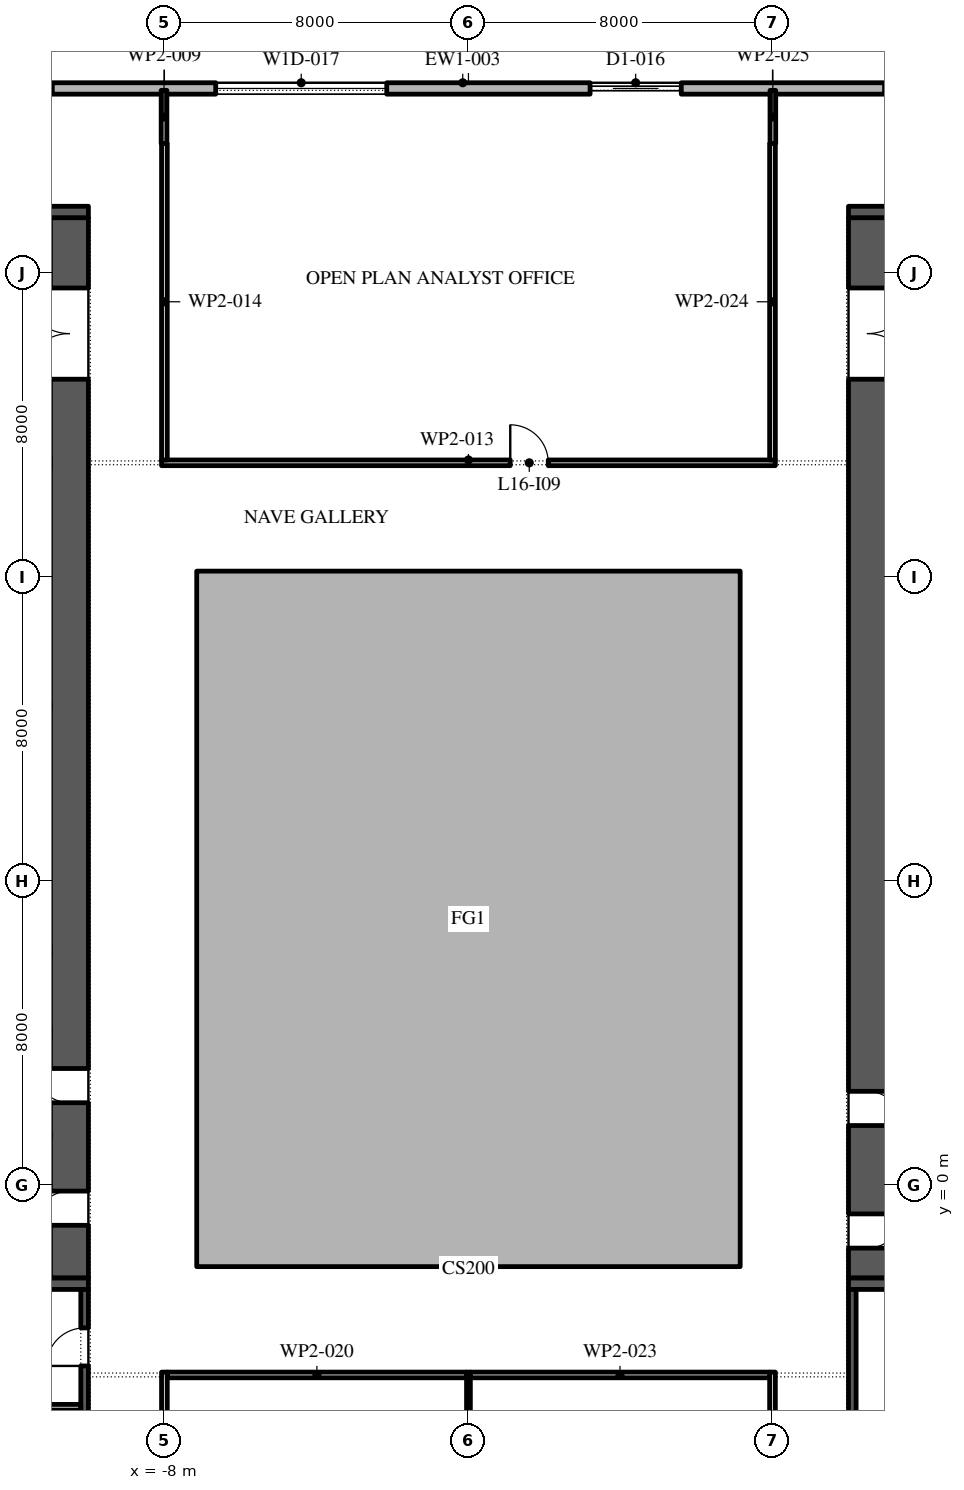
"""IFC4 building model, lengths in metres.
Left out: names, types, materials, properties, quantities, classifications, styles, units other than length and angle.
Written with IfcOpenShell. Run it as: python <this file> out.ifc"""

import sys

from ifc_helpers import new_model, si_unit, direction, frame, frame_2d, origin, place, context, subcontext, project, spatial, polyline, rectangle, outline, extrude, element, fill, save


model = new_model("IFC4")
c1 = context("Model", 3, precision=1e-05, world=origin(), true_north=direction((0.0, 1.0)))
c2 = subcontext(c1, "Body", "Model", "MODEL_VIEW")
j1 = project(units=[si_unit("LENGTHUNIT", "METRE"), si_unit("PLANEANGLEUNIT", "RADIAN")], contexts=[c1])
p1 = place(None, origin())
s1 = spatial("IfcSite", under=j1, at=p1, CompositionType="ELEMENT")
p2 = place(p1, origin())
s2 = spatial("IfcBuilding", under=s1, at=p2, CompositionType="ELEMENT")
p3 = place(p2, frame((0.0, 0.0, 77.4)))
s3 = spatial("IfcBuildingStorey", under=s2, at=p3, CompositionType="ELEMENT", Elevation=77.4)
p4 = place(p3, origin())
e1 = element("IfcWall", 1, at=p4, inside=s3, PredefinedType="STANDARD", context=c2, shape_type="SweptSolid", body=[
    extrude(outline(polyline([(-7.15, -2.15), (7.15, -2.15), (7.15, 16.15), (-7.15, 16.15), (-7.15, -2.15)]), holes=[polyline([(-7.0, -2.0), (-7.0, 16.0), (7.0, 16.0), (7.0, -2.0), (-7.0, -2.0)])]), origin(), (0.0, 0.0, 1.0), 4.0),
])
p5 = place(p3, frame((26.1, 28.85, 0.0), z_axis=(0.0, 0.0, 1.0), x_axis=(-1.0, 0.0, 0.0)))
e2 = element("IfcWall", 2, at=p5, inside=s3, PredefinedType="STANDARD", context=c2, shape_type="SweptSolid", body=[
    extrude(rectangle(XDim=52.5, YDim=0.3, at=frame_2d((26.25, 0.0))), origin(), (0.0, 0.0, 1.0), 4.0),
])
p6 = place(p5, frame((2.0, 0.0, 0.45)))
e3 = element("IfcOpeningElement", 3, at=p6, cuts=e2, PredefinedType="OPENING", context=c2, shape_type="SweptSolid", body=[
    extrude(rectangle(XDim=4.5, YDim=2.875, at=frame_2d((2.25, 1.438))), frame((0.0, 0.16, 0.0), z_axis=(0.0, -1.0, 0.0), x_axis=(1.0, 0.0, 0.0)), (0.0, 0.0, 1.0), 0.32),
])
p7 = place(p5, frame((10.65, 0.0, 0.45)))
e4 = element("IfcOpeningElement", 4, at=p7, cuts=e2, PredefinedType="OPENING", context=c2, shape_type="SweptSolid", body=[
    extrude(rectangle(XDim=4.5, YDim=2.875, at=frame_2d((2.25, 1.438))), frame((0.0, 0.16, 0.0), z_axis=(0.0, -1.0, 0.0), x_axis=(1.0, 0.0, 0.0)), (0.0, 0.0, 1.0), 0.32),
])
p8 = place(p5, frame((20.5, 0.0, 0.0)))
e5 = element("IfcOpeningElement", 5, at=p8, cuts=e2, PredefinedType="OPENING", context=c2, shape_type="SweptSolid", body=[
    extrude(rectangle(XDim=2.4, YDim=3.5, at=frame_2d((1.2, 1.75))), frame((0.0, 0.16, 0.0), z_axis=(0.0, -1.0, 0.0), x_axis=(1.0, 0.0, 0.0)), (0.0, 0.0, 1.0), 0.32),
])
p9 = place(p5, frame((28.25, 0.0, 0.45)))
e6 = element("IfcOpeningElement", 6, at=p9, cuts=e2, PredefinedType="OPENING", context=c2, shape_type="SweptSolid", body=[
    extrude(rectangle(XDim=4.5, YDim=2.875, at=frame_2d((2.25, 1.438))), frame((0.0, 0.16, 0.0), z_axis=(0.0, -1.0, 0.0), x_axis=(1.0, 0.0, 0.0)), (0.0, 0.0, 1.0), 0.32),
])
p10 = place(p5, frame((37.05, 0.0, 0.45)))
e7 = element("IfcOpeningElement", 7, at=p10, cuts=e2, PredefinedType="OPENING", context=c2, shape_type="SweptSolid", body=[
    extrude(rectangle(XDim=4.5, YDim=2.875, at=frame_2d((2.25, 1.438))), frame((0.0, 0.16, 0.0), z_axis=(0.0, -1.0, 0.0), x_axis=(1.0, 0.0, 0.0)), (0.0, 0.0, 1.0), 0.32),
])
p11 = place(p5, frame((45.85, 0.0, 0.45)))
e8 = element("IfcOpeningElement", 8, at=p11, cuts=e2, PredefinedType="OPENING", context=c2, shape_type="SweptSolid", body=[
    extrude(rectangle(XDim=4.5, YDim=2.875, at=frame_2d((2.25, 1.438))), frame((0.0, 0.16, 0.0), z_axis=(0.0, -1.0, 0.0), x_axis=(1.0, 0.0, 0.0)), (0.0, 0.0, 1.0), 0.32),
])
p12 = place(p3, frame((-10.5, -2.45, 0.0), z_axis=(0.0, 0.0, 1.0), x_axis=(0.0, 1.0, 0.0)))
e9 = element("IfcWall", 9, at=p12, inside=s3, PredefinedType="SHEAR", context=c2, shape_type="SweptSolid", body=[
    extrude(rectangle(XDim=27.9, YDim=1.0, at=frame_2d((13.95, 0.0))), origin(), (0.0, 0.0, 1.0), 4.0),
])
p13 = place(p12, frame((23.65, 0.0, 0.0)))
e10 = element("IfcOpeningElement", 10, at=p13, cuts=e9, PredefinedType="OPENING", context=c2, shape_type="SweptSolid", body=[
    extrude(rectangle(XDim=2.4, YDim=2.1, at=frame_2d((1.2, 1.05))), frame((0.0, 0.51, 0.0), z_axis=(0.0, -1.0, 0.0), x_axis=(1.0, 0.0, 0.0)), (0.0, 0.0, 1.0), 1.02),
])
p14 = place(p12, frame((1.387, 0.0, 0.0)))
e11 = element("IfcOpeningElement", 11, at=p14, cuts=e9, PredefinedType="OPENING", context=c2, shape_type="SweptSolid", body=[
    extrude(rectangle(XDim=0.9, YDim=2.1, at=frame_2d((0.45, 1.05))), frame((0.0, 0.51, 0.0), z_axis=(0.0, -1.0, 0.0), x_axis=(1.0, 0.0, 0.0)), (0.0, 0.0, 1.0), 1.02),
])
p15 = place(p12, frame((4.613, 0.0, 0.0)))
e12 = element("IfcOpeningElement", 12, at=p15, cuts=e9, PredefinedType="OPENING", context=c2, shape_type="SweptSolid", body=[
    extrude(rectangle(XDim=0.9, YDim=2.1, at=frame_2d((0.45, 1.05))), frame((0.0, 0.51, 0.0), z_axis=(0.0, -1.0, 0.0), x_axis=(1.0, 0.0, 0.0)), (0.0, 0.0, 1.0), 1.02),
])
for number, where, z_axis, x_axis in (
    (13, (-22.0, -2.6, 0.0), (0.0, 0.0, 1.0), (1.0, 0.0, 0.0)),
    (14, (-22.0, 25.6, 0.0), (0.0, 0.0, 1.0), (1.0, 0.0, 0.0)),
):
    element("IfcWall", number, at=place(p3, frame(where, z_axis=z_axis, x_axis=x_axis)), inside=s3, PredefinedType="SHEAR", context=c2, shape_type="SweptSolid", body=[
        extrude(rectangle(XDim=12.0, YDim=0.3, at=frame_2d((6.0, 0.0))), origin(), (0.0, 0.0, 1.0), 4.0),
    ])
p16 = place(p3, frame((-10.1, -15.8, 0.0), z_axis=(0.0, 0.0, 1.0), x_axis=(0.0, 1.0, 0.0)))
e15 = element("IfcWall", 15, at=p16, inside=s3, PredefinedType="SHEAR", context=c2, shape_type="SweptSolid", body=[
    extrude(rectangle(XDim=13.05, YDim=0.2, at=frame_2d((6.525, 0.0))), origin(), (0.0, 0.0, 1.0), 4.0),
])
p17 = place(p16, frame((4.488, 0.0, 0.0)))
e16 = element("IfcOpeningElement", 16, at=p17, cuts=e15, PredefinedType="OPENING", context=c2, shape_type="SweptSolid", body=[
    extrude(rectangle(XDim=0.9, YDim=2.1, at=frame_2d((0.45, 1.05))), frame((0.0, 0.11, 0.0), z_axis=(0.0, -1.0, 0.0), x_axis=(1.0, 0.0, 0.0)), (0.0, 0.0, 1.0), 0.22),
])
p18 = place(p16, frame((11.038, 0.0, 0.0)))
e17 = element("IfcOpeningElement", 17, at=p18, cuts=e15, PredefinedType="OPENING", context=c2, shape_type="SweptSolid", body=[
    extrude(rectangle(XDim=1.0, YDim=2.1, at=frame_2d((0.5, 1.05))), frame((0.0, 0.11, 0.0), z_axis=(0.0, -1.0, 0.0), x_axis=(1.0, 0.0, 0.0)), (0.0, 0.0, 1.0), 0.22),
])
p19 = place(p3, frame((-21.8, -5.85, 0.0), z_axis=(0.0, 0.0, 1.0), x_axis=(1.0, 0.0, 0.0)))
e18 = element("IfcWall", 18, at=p19, inside=s3, PredefinedType="PARTITIONING", context=c2, shape_type="SweptSolid", body=[
    extrude(rectangle(XDim=11.6, YDim=0.15, at=frame_2d((5.8, 0.0))), origin(), (0.0, 0.0, 1.0), 4.0),
])
p20 = place(p3, frame((10.5, -2.45, 0.0), z_axis=(0.0, 0.0, 1.0), x_axis=(0.0, 1.0, 0.0)))
e19 = element("IfcWall", 19, at=p20, inside=s3, PredefinedType="SHEAR", context=c2, shape_type="SweptSolid", body=[
    extrude(rectangle(XDim=27.9, YDim=1.0, at=frame_2d((13.95, 0.0))), origin(), (0.0, 0.0, 1.0), 4.0),
])
p21 = place(p20, frame((23.65, 0.0, 0.0)))
e20 = element("IfcOpeningElement", 20, at=p21, cuts=e19, PredefinedType="OPENING", context=c2, shape_type="SweptSolid", body=[
    extrude(rectangle(XDim=2.4, YDim=2.1, at=frame_2d((1.2, 1.05))), frame((0.0, 0.51, 0.0), z_axis=(0.0, -1.0, 0.0), x_axis=(1.0, 0.0, 0.0)), (0.0, 0.0, 1.0), 1.02),
])
p22 = place(p20, frame((0.788, 0.0, 0.0)))
e21 = element("IfcOpeningElement", 21, at=p22, cuts=e19, PredefinedType="OPENING", context=c2, shape_type="SweptSolid", body=[
    extrude(rectangle(XDim=0.9, YDim=2.1, at=frame_2d((0.45, 1.05))), frame((0.0, 0.51, 0.0), z_axis=(0.0, -1.0, 0.0), x_axis=(1.0, 0.0, 0.0)), (0.0, 0.0, 1.0), 1.02),
])
p23 = place(p20, frame((4.012, 0.0, 0.0)))
e22 = element("IfcOpeningElement", 22, at=p23, cuts=e19, PredefinedType="OPENING", context=c2, shape_type="SweptSolid", body=[
    extrude(rectangle(XDim=0.9, YDim=2.1, at=frame_2d((0.45, 1.05))), frame((0.0, 0.51, 0.0), z_axis=(0.0, -1.0, 0.0), x_axis=(1.0, 0.0, 0.0)), (0.0, 0.0, 1.0), 1.02),
])
for number, where, z_axis, x_axis in (
    (23, (10.0, -2.6, 0.0), (0.0, 0.0, 1.0), (1.0, 0.0, 0.0)),
    (24, (10.0, 25.6, 0.0), (0.0, 0.0, 1.0), (1.0, 0.0, 0.0)),
):
    element("IfcWall", number, at=place(p3, frame(where, z_axis=z_axis, x_axis=x_axis)), inside=s3, PredefinedType="SHEAR", context=c2, shape_type="SweptSolid", body=[
        extrude(rectangle(XDim=12.0, YDim=0.3, at=frame_2d((6.0, 0.0))), origin(), (0.0, 0.0, 1.0), 4.0),
    ])
p24 = place(p3, frame((10.1, -15.8, 0.0), z_axis=(0.0, 0.0, 1.0), x_axis=(0.0, 1.0, 0.0)))
e25 = element("IfcWall", 25, at=p24, inside=s3, PredefinedType="SHEAR", context=c2, shape_type="SweptSolid", body=[
    extrude(rectangle(XDim=13.05, YDim=0.2, at=frame_2d((6.525, 0.0))), origin(), (0.0, 0.0, 1.0), 4.0),
])
p25 = place(p24, frame((6.075, 0.0, 0.0)))
e26 = element("IfcOpeningElement", 26, at=p25, cuts=e25, PredefinedType="OPENING", context=c2, shape_type="SweptSolid", body=[
    extrude(rectangle(XDim=0.9, YDim=2.1, at=frame_2d((0.45, 1.05))), frame((0.0, 0.11, 0.0), z_axis=(0.0, -1.0, 0.0), x_axis=(1.0, 0.0, 0.0)), (0.0, 0.0, 1.0), 0.22),
])
p26 = place(p3, frame((-8.01, 28.8, 0.0), z_axis=(0.0, 0.0, 1.0), x_axis=(0.0, -1.0, 0.0)))
e27 = element("IfcWall", 27, at=p26, inside=s3, PredefinedType="PARTITIONING", context=c2, shape_type="SweptSolid", body=[
    extrude(rectangle(XDim=1.4, YDim=0.15, at=frame_2d((0.7, 0.0))), origin(), (0.0, 0.0, 1.0), 4.0),
])
p27 = place(p3, frame((-8.0, -4.925, 0.0), z_axis=(0.0, 0.0, 1.0), x_axis=(0.0, -1.0, 0.0)))
e28 = element("IfcWall", 28, at=p27, inside=s3, PredefinedType="PARTITIONING", context=c2, shape_type="SweptSolid", body=[
    extrude(rectangle(XDim=9.625, YDim=0.15, at=frame_2d((4.812, 0.0))), origin(), (0.0, 0.0, 1.0), 4.0),
])
p28 = place(p27, frame((6.175, 0.0, 0.0)))
e29 = element("IfcOpeningElement", 29, at=p28, cuts=e28, PredefinedType="OPENING", context=c2, shape_type="SweptSolid", body=[
    extrude(rectangle(XDim=1.0, YDim=2.1, at=frame_2d((0.5, 1.05))), frame((0.0, 0.085, 0.0), z_axis=(0.0, -1.0, 0.0), x_axis=(1.0, 0.0, 0.0)), (0.0, 0.0, 1.0), 0.17),
])
p29 = place(p3, frame((-8.075, 19.0, 0.0), z_axis=(0.0, 0.0, 1.0), x_axis=(1.0, 0.0, 0.0)))
e30 = element("IfcWall", 30, at=p29, inside=s3, PredefinedType="PARTITIONING", context=c2, shape_type="SweptSolid", body=[
    extrude(rectangle(XDim=16.15, YDim=0.15, at=frame_2d((8.075, 0.0))), origin(), (0.0, 0.0, 1.0), 4.0),
])
p30 = place(p29, frame((9.175, 0.0, 0.0)))
e31 = element("IfcOpeningElement", 31, at=p30, cuts=e30, PredefinedType="OPENING", context=c2, shape_type="SweptSolid", body=[
    extrude(rectangle(XDim=1.0, YDim=2.1, at=frame_2d((0.5, 1.05))), frame((0.0, 0.085, 0.0), z_axis=(0.0, -1.0, 0.0), x_axis=(1.0, 0.0, 0.0)), (0.0, 0.0, 1.0), 0.17),
])
p31 = place(p3, frame((-8.0, 27.4, 0.0), z_axis=(0.0, 0.0, 1.0), x_axis=(0.0, -1.0, 0.0)))
e32 = element("IfcWall", 32, at=p31, inside=s3, PredefinedType="PARTITIONING", context=c2, shape_type="SweptSolid", body=[
    extrude(rectangle(XDim=8.325, YDim=0.15, at=frame_2d((4.163, 0.0))), origin(), (0.0, 0.0, 1.0), 4.0),
])
p32 = place(p3, frame((0.0, -14.05, 0.0), z_axis=(0.0, 0.0, 1.0), x_axis=(0.0, 1.0, 0.0)))
e33 = element("IfcWall", 33, at=p32, inside=s3, PredefinedType="PARTITIONING", context=c2, shape_type="SweptSolid", body=[
    extrude(rectangle(XDim=9.125, YDim=0.1, at=frame_2d((4.562, 0.0))), origin(), (0.0, 0.0, 1.0), 4.0),
])
p33 = place(p3, frame((-0.05, -5.0, 0.0), z_axis=(0.0, 0.0, 1.0), x_axis=(-1.0, 0.0, 0.0)))
e34 = element("IfcWall", 34, at=p33, inside=s3, PredefinedType="PARTITIONING", context=c2, shape_type="SweptSolid", body=[
    extrude(rectangle(XDim=7.875, YDim=0.15, at=frame_2d((3.938, 0.0))), origin(), (0.0, 0.0, 1.0), 4.0),
])
p34 = place(p3, frame((8.0, -13.95, 0.0), z_axis=(0.0, 0.0, 1.0), x_axis=(0.0, 1.0, 0.0)))
e35 = element("IfcWall", 35, at=p34, inside=s3, PredefinedType="PARTITIONING", context=c2, shape_type="SweptSolid", body=[
    extrude(rectangle(XDim=9.025, YDim=0.15, at=frame_2d((4.512, 0.0))), origin(), (0.0, 0.0, 1.0), 4.0),
])
p35 = place(p34, frame((4.05, 0.0, 0.0)))
e36 = element("IfcOpeningElement", 36, at=p35, cuts=e35, PredefinedType="OPENING", context=c2, shape_type="SweptSolid", body=[
    extrude(rectangle(XDim=1.0, YDim=2.1, at=frame_2d((0.5, 1.05))), frame((0.0, 0.085, 0.0), z_axis=(0.0, -1.0, 0.0), x_axis=(1.0, 0.0, 0.0)), (0.0, 0.0, 1.0), 0.17),
])
p36 = place(p3, frame((7.925, -5.0, 0.0), z_axis=(0.0, 0.0, 1.0), x_axis=(-1.0, 0.0, 0.0)))
e37 = element("IfcWall", 37, at=p36, inside=s3, PredefinedType="PARTITIONING", context=c2, shape_type="SweptSolid", body=[
    extrude(rectangle(XDim=7.875, YDim=0.15, at=frame_2d((3.938, 0.0))), origin(), (0.0, 0.0, 1.0), 4.0),
])
p37 = place(p3, frame((8.0, 19.075, 0.0), z_axis=(0.0, 0.0, 1.0), x_axis=(0.0, 1.0, 0.0)))
e38 = element("IfcWall", 38, at=p37, inside=s3, PredefinedType="PARTITIONING", context=c2, shape_type="SweptSolid", body=[
    extrude(rectangle(XDim=8.325, YDim=0.15, at=frame_2d((4.163, 0.0))), origin(), (0.0, 0.0, 1.0), 4.0),
])
p38 = place(p3, frame((8.01, 27.4, 0.0), z_axis=(0.0, 0.0, 1.0), x_axis=(0.0, 1.0, 0.0)))
e39 = element("IfcWall", 39, at=p38, inside=s3, PredefinedType="PARTITIONING", context=c2, shape_type="SweptSolid", body=[
    extrude(rectangle(XDim=1.4, YDim=0.15, at=frame_2d((0.7, 0.0))), origin(), (0.0, 0.0, 1.0), 4.0),
])
p39 = place(p8, origin())
e40 = element("IfcDoor", 40, at=p39, inside=s3, OperationType="DOUBLE_DOOR_SLIDING", PredefinedType="DOOR", context=c2, shape_type="SweptSolid", body=[
    extrude(rectangle(XDim=2.4, YDim=3.5, at=frame_2d((1.2, 1.75))), frame((0.0, 0.025, 0.0), z_axis=(0.0, -1.0, 0.0), x_axis=(1.0, 0.0, 0.0)), (0.0, 0.0, 1.0), 0.05),
])
fill(e5, e40)
p40 = place(p9, origin())
e41 = element("IfcWindow", 41, at=p40, inside=s3, PartitioningType="DOUBLE_PANEL_VERTICAL", PredefinedType="WINDOW", context=c2, shape_type="SweptSolid", body=[
    extrude(rectangle(XDim=4.5, YDim=2.875, at=frame_2d((2.25, 1.438))), frame((0.0, 0.03, 0.0), z_axis=(0.0, -1.0, 0.0), x_axis=(1.0, 0.0, 0.0)), (0.0, 0.0, 1.0), 0.06),
])
fill(e6, e41)
p41 = place(p13, origin())
e42 = element("IfcDoor", 42, at=p41, inside=s3, OperationType="DOUBLE_DOOR_SINGLE_SWING", PredefinedType="DOOR", context=c2, shape_type="SweptSolid", body=[
    extrude(rectangle(XDim=2.4, YDim=2.1, at=frame_2d((1.2, 1.05))), frame((0.0, 0.025, 0.0), z_axis=(0.0, -1.0, 0.0), x_axis=(1.0, 0.0, 0.0)), (0.0, 0.0, 1.0), 0.05),
])
fill(e10, e42)
p42 = place(p18, origin())
e43 = element("IfcDoor", 43, at=p42, inside=s3, OperationType="SINGLE_SWING_RIGHT", PredefinedType="DOOR", context=c2, shape_type="SweptSolid", body=[
    extrude(rectangle(XDim=1.0, YDim=2.1, at=frame_2d((0.5, 1.05))), frame((0.0, 0.1, 0.0), z_axis=(0.0, -1.0, 0.0), x_axis=(1.0, 0.0, 0.0)), (0.0, 0.0, 1.0), 0.05),
])
fill(e17, e43)
p43 = place(p21, frame((2.4, 0.0, 0.0), z_axis=(0.0, 0.0, 1.0), x_axis=(-1.0, 0.0, 0.0)))
e44 = element("IfcDoor", 44, at=p43, inside=s3, OperationType="DOUBLE_DOOR_SINGLE_SWING", PredefinedType="DOOR", context=c2, shape_type="SweptSolid", body=[
    extrude(rectangle(XDim=2.4, YDim=2.1, at=frame_2d((1.2, 1.05))), frame((0.0, 0.025, 0.0), z_axis=(0.0, -1.0, 0.0), x_axis=(1.0, 0.0, 0.0)), (0.0, 0.0, 1.0), 0.05),
])
fill(e20, e44)
p44 = place(p30, origin())
e45 = element("IfcDoor", 45, at=p44, inside=s3, OperationType="SINGLE_SWING_RIGHT", PredefinedType="DOOR", context=c2, shape_type="SweptSolid", body=[
    extrude(rectangle(XDim=1.0, YDim=2.1, at=frame_2d((0.5, 1.05))), frame((0.0, 0.025, 0.0), z_axis=(0.0, -1.0, 0.0), x_axis=(1.0, 0.0, 0.0)), (0.0, 0.0, 1.0), 0.05),
])
fill(e31, e45)
save(model, sys.argv[1])
